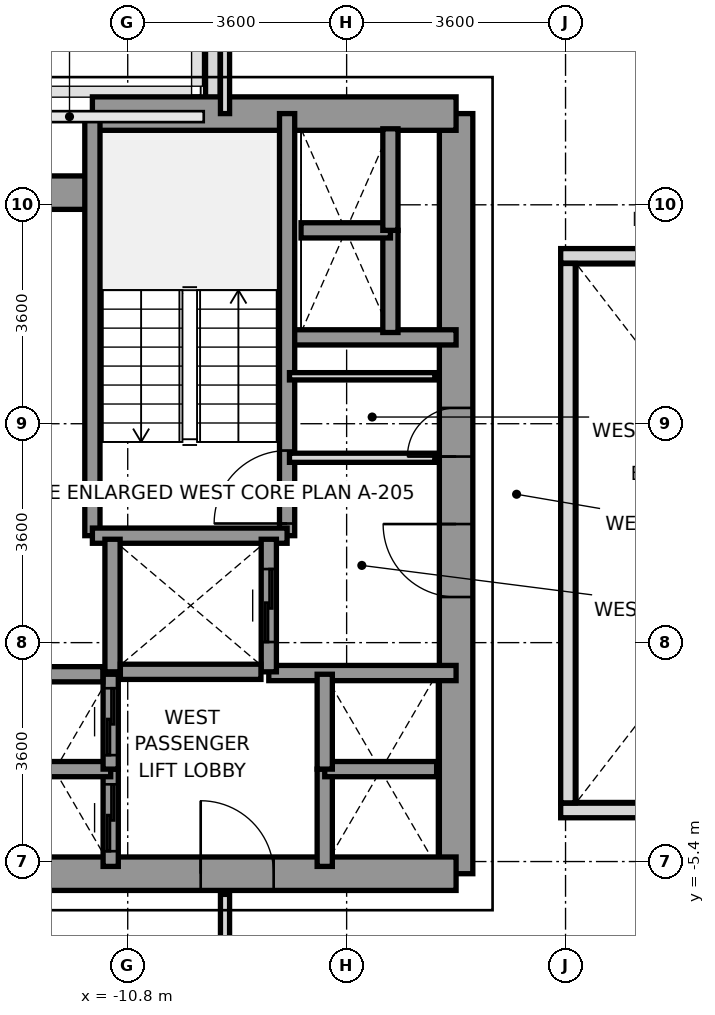
"""IFC4 building model, lengths in metres.
Left out: names, types, materials, properties, quantities, classifications, styles, units other than length and angle.
Written with IfcOpenShell. Run it as: python <this file> out.ifc"""

import sys

from ifc_helpers import new_model, si_unit, direction, frame, frame_2d, origin, place, context, subcontext, project, spatial, rectangle, extrude, source, transform, mapped, element, fill, save


model = new_model("IFC4")
c1 = context("Model", 3, precision=1e-05, world=origin(), true_north=direction((0.0, 1.0)))
c2 = subcontext(c1, "Body", "Model", "MODEL_VIEW")
j1 = project(units=[si_unit("LENGTHUNIT", "METRE"), si_unit("PLANEANGLEUNIT", "RADIAN")], contexts=[c1])
p1 = place(None, origin())
s1 = spatial("IfcSite", under=j1, at=p1, CompositionType="ELEMENT")
p2 = place(p1, origin())
s2 = spatial("IfcBuilding", under=s1, at=p2, CompositionType="ELEMENT")
p3 = place(p2, frame((0.0, 0.0, 51.0)))
s3 = spatial("IfcBuildingStorey", under=s2, at=p3, CompositionType="ELEMENT", Elevation=51.0)
p4 = place(p3, frame((-9.4, 6.953, 0.0), z_axis=(0.0, 0.0, 1.0), x_axis=(0.0, 1.0, 0.0)))
e1 = element("IfcWall", 1, at=p4, inside=s3, PredefinedType="PARAPET", context=c2, shape_type="SweptSolid", body=[
    extrude(rectangle(XDim=1.444, YDim=0.24, at=frame_2d((0.722, 0.0))), origin(), (0.0, 0.0, 1.0), 1.15),
])
p5 = place(p3, frame((-5.4, -5.6, 0.0), z_axis=(0.0, 0.0, 1.0), x_axis=(0.0, 1.0, 0.0)))
e2 = element("IfcWall", 2, at=p5, inside=s3, PredefinedType="SHEAR", context=c2, shape_type="SweptSolid", body=[
    extrude(rectangle(XDim=12.5, YDim=0.55, at=frame_2d((6.25, 0.0))), origin(), (0.0, 0.0, 1.0), 3.2),
])
p6 = place(p5, frame((4.55, 0.0, 0.0)))
e3 = element("IfcOpeningElement", 3, at=p6, cuts=e2, PredefinedType="OPENING", context=c2, shape_type="SweptSolid", body=[
    extrude(rectangle(XDim=1.2, YDim=2.2, at=frame_2d((0.6, 1.1))), frame((0.0, 0.285, 0.0), z_axis=(0.0, -1.0, 0.0), x_axis=(1.0, 0.0, 0.0)), (0.0, 0.0, 1.0), 0.57),
])
p7 = place(p5, frame((6.86, 0.0, 0.0)))
e4 = element("IfcOpeningElement", 4, at=p7, cuts=e2, PredefinedType="OPENING", context=c2, shape_type="SweptSolid", body=[
    extrude(rectangle(XDim=0.8, YDim=2.1, at=frame_2d((0.4, 1.05))), frame((0.0, 0.285, 0.0), z_axis=(0.0, -1.0, 0.0), x_axis=(1.0, 0.0, 0.0)), (0.0, 0.0, 1.0), 0.57),
])
p8 = place(p3, frame((-11.381, 6.9, 0.0), z_axis=(0.0, 0.0, 1.0), x_axis=(1.0, 0.0, 0.0)))
e5 = element("IfcWall", 5, at=p8, inside=s3, PredefinedType="SHEAR", context=c2, shape_type="SweptSolid", body=[
    extrude(rectangle(XDim=5.981, YDim=0.55, at=frame_2d((2.991, 0.0))), origin(), (0.0, 0.0, 1.0), 3.2),
])
p9 = place(p3, frame((-13.2, 5.6, 0.0), z_axis=(0.0, 0.0, 1.0), x_axis=(1.0, 0.0, 0.0)))
e6 = element("IfcWall", 6, at=p9, inside=s3, PredefinedType="SHEAR", context=c2, shape_type="SweptSolid", body=[
    extrude(rectangle(XDim=1.819, YDim=0.55, at=frame_2d((0.909, 0.0))), origin(), (0.0, 0.0, 1.0), 3.2),
])
p10 = place(p3, frame((-13.2, -5.6, 0.0), z_axis=(0.0, 0.0, 1.0), x_axis=(1.0, 0.0, 0.0)))
e7 = element("IfcWall", 7, at=p10, inside=s3, PredefinedType="SHEAR", context=c2, shape_type="SweptSolid", body=[
    extrude(rectangle(XDim=7.8, YDim=0.55, at=frame_2d((3.9, 0.0))), origin(), (0.0, 0.0, 1.0), 3.2),
])
p11 = place(p10, frame((3.6, 0.0, 0.0)))
e8 = element("IfcOpeningElement", 8, at=p11, cuts=e7, PredefinedType="OPENING", context=c2, shape_type="SweptSolid", body=[
    extrude(rectangle(XDim=1.2, YDim=2.2, at=frame_2d((0.6, 1.1))), frame((0.0, 0.285, 0.0), z_axis=(0.0, -1.0, 0.0), x_axis=(1.0, 0.0, 0.0)), (0.0, 0.0, 1.0), 0.57),
])
p12 = place(p3, frame((-8.18, 3.22, 0.0), z_axis=(0.0, 0.0, 1.0), x_axis=(1.0, 0.0, 0.0)))
e9 = element("IfcWall", 9, at=p12, inside=s3, PredefinedType="SOLIDWALL", context=c2, shape_type="SweptSolid", body=[
    extrude(rectangle(XDim=2.78, YDim=0.25, at=frame_2d((1.39, 0.0))), origin(), (0.0, 0.0, 1.0), 3.2),
])
p13 = place(p3, frame((-8.48, -2.3, 0.0), z_axis=(0.0, 0.0, 1.0), x_axis=(1.0, 0.0, 0.0)))
e10 = element("IfcWall", 10, at=p13, inside=s3, PredefinedType="SOLIDWALL", context=c2, shape_type="SweptSolid", body=[
    extrude(rectangle(XDim=3.08, YDim=0.25, at=frame_2d((1.54, 0.0))), origin(), (0.0, 0.0, 1.0), 3.2),
])
p14 = place(p3, frame((-8.179, -0.041, 0.0), z_axis=(0.0, 0.0, 1.0), x_axis=(0.0, 1.0, 0.0)))
e11 = element("IfcWall", 11, at=p14, inside=s3, PredefinedType="SOLIDWALL", context=c2, shape_type="SweptSolid", body=[
    extrude(rectangle(XDim=6.941, YDim=0.25, at=frame_2d((3.47, 0.0))), origin(), (0.0, 0.0, 1.0), 3.2),
])
p15 = place(p14, frame((0.2, 0.0, 0.0)))
e12 = element("IfcOpeningElement", 12, at=p15, cuts=e11, PredefinedType="OPENING", context=c2, shape_type="SweptSolid", body=[
    extrude(rectangle(XDim=1.2, YDim=2.2, at=frame_2d((0.6, 1.1))), frame((0.0, 0.135, 0.0), z_axis=(0.0, -1.0, 0.0), x_axis=(1.0, 0.0, 0.0)), (0.0, 0.0, 1.0), 0.27),
])
p16 = place(p3, frame((-11.381, -0.041, 0.0), z_axis=(0.0, 0.0, 1.0), x_axis=(0.0, 1.0, 0.0)))
e13 = element("IfcWall", 13, at=p16, inside=s3, PredefinedType="SOLIDWALL", context=c2, shape_type="SweptSolid", body=[
    extrude(rectangle(XDim=6.941, YDim=0.25, at=frame_2d((3.47, 0.0))), origin(), (0.0, 0.0, 1.0), 3.2),
])
p17 = place(p3, frame((-11.381, -0.041, 0.0), z_axis=(0.0, 0.0, 1.0), x_axis=(1.0, 0.0, 0.0)))
e14 = element("IfcWall", 14, at=p17, inside=s3, PredefinedType="SOLIDWALL", context=c2, shape_type="SweptSolid", body=[
    extrude(rectangle(XDim=3.202, YDim=0.25, at=frame_2d((1.601, 0.0))), origin(), (0.0, 0.0, 1.0), 3.2),
])
p18 = place(p3, frame((-11.05, -2.28, 0.0), z_axis=(0.0, 0.0, 1.0), x_axis=(0.0, 1.0, 0.0)))
e15 = element("IfcWall", 15, at=p18, inside=s3, PredefinedType="SOLIDWALL", context=c2, shape_type="SweptSolid", body=[
    extrude(rectangle(XDim=2.18, YDim=0.25, at=frame_2d((1.09, 0.0))), origin(), (0.0, 0.0, 1.0), 3.2),
])
p19 = place(p3, frame((-8.48, -2.28, 0.0), z_axis=(0.0, 0.0, 1.0), x_axis=(0.0, 1.0, 0.0)))
e16 = element("IfcWall", 16, at=p19, inside=s3, PredefinedType="SOLIDWALL", context=c2, shape_type="SweptSolid", body=[
    extrude(rectangle(XDim=2.18, YDim=0.25, at=frame_2d((1.09, 0.0))), origin(), (0.0, 0.0, 1.0), 3.2),
])
p20 = place(p19, frame((0.49, 0.0, 0.0)))
e17 = element("IfcOpeningElement", 17, at=p20, cuts=e16, PredefinedType="OPENING", context=c2, shape_type="SweptSolid", body=[
    extrude(rectangle(XDim=1.2, YDim=2.2, at=frame_2d((0.6, 1.1))), frame((0.0, 0.135, 0.0), z_axis=(0.0, -1.0, 0.0), x_axis=(1.0, 0.0, 0.0)), (0.0, 0.0, 1.0), 0.27),
])
p21 = place(p3, frame((-10.921, -2.28, 0.0), z_axis=(0.0, 0.0, 1.0), x_axis=(1.0, 0.0, 0.0)))
e18 = element("IfcWall", 18, at=p21, inside=s3, PredefinedType="SOLIDWALL", context=c2, shape_type="SweptSolid", body=[
    extrude(rectangle(XDim=2.312, YDim=0.25, at=frame_2d((1.156, 0.0))), origin(), (0.0, 0.0, 1.0), 3.2),
])
p22 = place(p3, frame((-11.08, -5.48, 0.0), z_axis=(0.0, 0.0, 1.0), x_axis=(0.0, 1.0, 0.0)))
e19 = element("IfcWall", 19, at=p22, inside=s3, PredefinedType="SOLIDWALL", context=c2, shape_type="SweptSolid", body=[
    extrude(rectangle(XDim=1.6, YDim=0.25, at=frame_2d((0.8, 0.0))), origin(), (0.0, 0.0, 1.0), 3.2),
])
p23 = place(p22, frame((0.25, 0.0, 0.0)))
e20 = element("IfcOpeningElement", 20, at=p23, cuts=e19, PredefinedType="OPENING", context=c2, shape_type="SweptSolid", body=[
    extrude(rectangle(XDim=1.1, YDim=2.2, at=frame_2d((0.55, 1.1))), frame((0.0, 0.135, 0.0), z_axis=(0.0, -1.0, 0.0), x_axis=(1.0, 0.0, 0.0)), (0.0, 0.0, 1.0), 0.27),
])
p24 = place(p3, frame((-12.92, -3.88, 0.0), z_axis=(0.0, 0.0, 1.0), x_axis=(1.0, 0.0, 0.0)))
e21 = element("IfcWall", 21, at=p24, inside=s3, PredefinedType="SOLIDWALL", context=c2, shape_type="SweptSolid", body=[
    extrude(rectangle(XDim=1.84, YDim=0.25, at=frame_2d((0.92, 0.0))), origin(), (0.0, 0.0, 1.0), 3.2),
])
p25 = place(p3, frame((-11.08, -3.88, 0.0), z_axis=(0.0, 0.0, 1.0), x_axis=(0.0, 1.0, 0.0)))
e22 = element("IfcWall", 22, at=p25, inside=s3, PredefinedType="SOLIDWALL", context=c2, shape_type="SweptSolid", body=[
    extrude(rectangle(XDim=1.56, YDim=0.25, at=frame_2d((0.78, 0.0))), origin(), (0.0, 0.0, 1.0), 3.2),
])
p26 = place(p25, frame((0.23, 0.0, 0.0)))
e23 = element("IfcOpeningElement", 23, at=p26, cuts=e22, PredefinedType="OPENING", context=c2, shape_type="SweptSolid", body=[
    extrude(rectangle(XDim=1.1, YDim=2.2, at=frame_2d((0.55, 1.1))), frame((0.0, 0.135, 0.0), z_axis=(0.0, -1.0, 0.0), x_axis=(1.0, 0.0, 0.0)), (0.0, 0.0, 1.0), 0.27),
])
p27 = place(p3, frame((-12.791, -2.32, 0.0), z_axis=(0.0, 0.0, 1.0), x_axis=(1.0, 0.0, 0.0)))
e24 = element("IfcWall", 24, at=p27, inside=s3, PredefinedType="SOLIDWALL", context=c2, shape_type="SweptSolid", body=[
    extrude(rectangle(XDim=1.582, YDim=0.25, at=frame_2d((0.791, 0.0))), origin(), (0.0, 0.0, 1.0), 3.2),
])
p28 = place(p3, frame((-7.56, -5.48, 0.0), z_axis=(0.0, 0.0, 1.0), x_axis=(0.0, 1.0, 0.0)))
e25 = element("IfcWall", 25, at=p28, inside=s3, PredefinedType="SOLIDWALL", context=c2, shape_type="SweptSolid", body=[
    extrude(rectangle(XDim=1.6, YDim=0.25, at=frame_2d((0.8, 0.0))), origin(), (0.0, 0.0, 1.0), 3.2),
])
p29 = place(p3, frame((-7.56, -3.88, 0.0), z_axis=(0.0, 0.0, 1.0), x_axis=(1.0, 0.0, 0.0)))
e26 = element("IfcWall", 26, at=p29, inside=s3, PredefinedType="SOLIDWALL", context=c2, shape_type="SweptSolid", body=[
    extrude(rectangle(XDim=1.84, YDim=0.25, at=frame_2d((0.92, 0.0))), origin(), (0.0, 0.0, 1.0), 3.2),
])
p30 = place(p3, frame((-7.56, -3.88, 0.0), z_axis=(0.0, 0.0, 1.0), x_axis=(0.0, 1.0, 0.0)))
e27 = element("IfcWall", 27, at=p30, inside=s3, PredefinedType="SOLIDWALL", context=c2, shape_type="SweptSolid", body=[
    extrude(rectangle(XDim=1.56, YDim=0.25, at=frame_2d((0.78, 0.0))), origin(), (0.0, 0.0, 1.0), 3.2),
])
p31 = place(p3, frame((-6.48, 3.3, 0.0), z_axis=(0.0, 0.0, 1.0), x_axis=(0.0, 1.0, 0.0)))
e28 = element("IfcWall", 28, at=p31, inside=s3, PredefinedType="SOLIDWALL", context=c2, shape_type="SweptSolid", body=[
    extrude(rectangle(XDim=1.68, YDim=0.25, at=frame_2d((0.84, 0.0))), origin(), (0.0, 0.0, 1.0), 3.2),
])
p32 = place(p3, frame((-7.95, 4.98, 0.0), z_axis=(0.0, 0.0, 1.0), x_axis=(1.0, 0.0, 0.0)))
e29 = element("IfcWall", 29, at=p32, inside=s3, PredefinedType="SOLIDWALL", context=c2, shape_type="SweptSolid", body=[
    extrude(rectangle(XDim=1.47, YDim=0.25, at=frame_2d((0.735, 0.0))), origin(), (0.0, 0.0, 1.0), 3.2),
])
p33 = place(p3, frame((-6.48, 4.98, 0.0), z_axis=(0.0, 0.0, 1.0), x_axis=(0.0, 1.0, 0.0)))
e30 = element("IfcWall", 30, at=p33, inside=s3, PredefinedType="SOLIDWALL", context=c2, shape_type="SweptSolid", body=[
    extrude(rectangle(XDim=1.67, YDim=0.25, at=frame_2d((0.835, 0.0))), origin(), (0.0, 0.0, 1.0), 3.2),
])
p34 = place(p3, frame((-8.14, 1.24, 0.0), z_axis=(0.0, 0.0, 1.0), x_axis=(1.0, 0.0, 0.0)))
e31 = element("IfcWall", 31, at=p34, inside=s3, PredefinedType="PARTITIONING", context=c2, shape_type="SweptSolid", body=[
    extrude(rectangle(XDim=2.39, YDim=0.15, at=frame_2d((1.195, 0.0))), origin(), (0.0, 0.0, 1.0), 2.3),
])
p35 = place(p3, frame((-8.14, 2.58, 0.0), z_axis=(0.0, 0.0, 1.0), x_axis=(1.0, 0.0, 0.0)))
e32 = element("IfcWall", 32, at=p35, inside=s3, PredefinedType="PARTITIONING", context=c2, shape_type="SweptSolid", body=[
    extrude(rectangle(XDim=2.39, YDim=0.12, at=frame_2d((1.195, 0.0))), origin(), (0.0, 0.0, 1.0), 2.3),
])
p36 = place(p3, frame((-9.2, 6.9, 0.0), z_axis=(0.0, 0.0, 1.0), x_axis=(0.0, 1.0, 0.0)))
e33 = element("IfcWall", 33, at=p36, inside=s3, PredefinedType="PARTITIONING", context=c2, shape_type="SweptSolid", body=[
    extrude(rectangle(XDim=8.78, YDim=0.15, at=frame_2d((4.39, 0.0))), origin(), (0.0, 0.0, 1.0), 2.65),
])
p37 = place(p3, frame((-9.2, -15.68, 0.0), z_axis=(0.0, 0.0, 1.0), x_axis=(0.0, 1.0, 0.0)))
e34 = element("IfcWall", 34, at=p37, inside=s3, PredefinedType="PARTITIONING", context=c2, shape_type="SweptSolid", body=[
    extrude(rectangle(XDim=9.74, YDim=0.15, at=frame_2d((4.87, 0.0))), origin(), (0.0, 0.0, 1.0), 2.65),
])
for number, where, z_axis, x_axis in (
    (35, (-3.68, -4.56, 0.0), (0.0, 0.0, 1.0), (1.0, 0.0, 0.0)),
    (36, (-3.68, 4.56, 0.0), (0.0, 0.0, 1.0), (1.0, 0.0, 0.0)),
):
    element("IfcWall", number, at=place(p3, frame(where, z_axis=z_axis, x_axis=x_axis)), inside=s3, PredefinedType="PARAPET", context=c2, shape_type="SweptSolid", body=[
        extrude(rectangle(XDim=7.36, YDim=0.24, at=frame_2d((3.68, 0.0))), origin(), (0.0, 0.0, 1.0), 1.15),
    ])
p38 = place(p3, frame((-3.56, -4.435, 0.0), z_axis=(0.0, 0.0, 1.0), x_axis=(0.0, 1.0, 0.0)))
e37 = element("IfcWall", 37, at=p38, inside=s3, PredefinedType="PARAPET", context=c2, shape_type="SweptSolid", body=[
    extrude(rectangle(XDim=8.87, YDim=0.24, at=frame_2d((4.435, 0.0))), origin(), (0.0, 0.0, 1.0), 1.15),
])
m1 = source(origin(), c2, "Body", "SweptSolid", [
    extrude(rectangle(XDim=1.2, YDim=2.2, at=frame_2d((0.6, 1.1))), frame((0.0, 0.025, 0.0), z_axis=(0.0, -1.0, 0.0), x_axis=(1.0, 0.0, 0.0)), (0.0, 0.0, 1.0), 0.05),
])
p39 = place(p15, origin())
e38 = element("IfcDoor", 38, at=p39, inside=s3, OperationType="SINGLE_SWING_LEFT", PredefinedType="DOOR", context=c2, shape_type="MappedRepresentation", body=[
    mapped(m1, transform((0.0, 0.0, 0.0), x_axis=(1.0, 0.0, 0.0), y_axis=(0.0, 1.0, 0.0), z_axis=(0.0, 0.0, 1.0), scale=1.0)),
])
fill(e12, e38)
p40 = place(p6, origin())
e39 = element("IfcDoor", 39, at=p40, inside=s3, OperationType="SINGLE_SWING_RIGHT", PredefinedType="DOOR", context=c2, shape_type="MappedRepresentation", body=[
    mapped(m1, transform((0.0, 0.0, 0.0), x_axis=(1.0, 0.0, 0.0), y_axis=(0.0, 1.0, 0.0), z_axis=(0.0, 0.0, 1.0), scale=1.0)),
])
fill(e3, e39)
p41 = place(p11, origin())
e40 = element("IfcDoor", 40, at=p41, inside=s3, OperationType="SINGLE_SWING_LEFT", PredefinedType="DOOR", context=c2, shape_type="MappedRepresentation", body=[
    mapped(m1, transform((0.0, 0.0, 0.0), x_axis=(1.0, 0.0, 0.0), y_axis=(0.0, 1.0, 0.0), z_axis=(0.0, 0.0, 1.0), scale=1.0)),
])
fill(e8, e40)
m2 = source(origin(), c2, "Body", "SweptSolid", [
    extrude(rectangle(XDim=0.8, YDim=2.1, at=frame_2d((0.4, 1.05))), frame((0.0, 0.025, 0.0), z_axis=(0.0, -1.0, 0.0), x_axis=(1.0, 0.0, 0.0)), (0.0, 0.0, 1.0), 0.05),
])
p42 = place(p7, origin())
e41 = element("IfcDoor", 41, at=p42, inside=s3, OperationType="SINGLE_SWING_LEFT", PredefinedType="DOOR", context=c2, shape_type="MappedRepresentation", body=[
    mapped(m2, transform((0.0, 0.0, 0.0), x_axis=(1.0, 0.0, 0.0), y_axis=(0.0, 1.0, 0.0), z_axis=(0.0, 0.0, 1.0), scale=1.0)),
])
fill(e4, e41)
p43 = place(p20, origin())
e42 = element("IfcDoor", 42, at=p43, inside=s3, OperationType="SLIDING_TO_RIGHT", PredefinedType="DOOR", context=c2, shape_type="MappedRepresentation", body=[
    mapped(m1, transform((0.0, 0.0, 0.0), x_axis=(1.0, 0.0, 0.0), y_axis=(0.0, 1.0, 0.0), z_axis=(0.0, 0.0, 1.0), scale=1.0)),
])
fill(e17, e42)
m3 = source(origin(), c2, "Body", "SweptSolid", [
    extrude(rectangle(XDim=1.1, YDim=2.2, at=frame_2d((0.55, 1.1))), frame((0.0, 0.025, 0.0), z_axis=(0.0, -1.0, 0.0), x_axis=(1.0, 0.0, 0.0)), (0.0, 0.0, 1.0), 0.05),
])
p44 = place(p23, origin())
e43 = element("IfcDoor", 43, at=p44, inside=s3, OperationType="SLIDING_TO_LEFT", PredefinedType="DOOR", context=c2, shape_type="MappedRepresentation", body=[
    mapped(m3, transform((0.0, 0.0, 0.0), x_axis=(1.0, 0.0, 0.0), y_axis=(0.0, 1.0, 0.0), z_axis=(0.0, 0.0, 1.0), scale=1.0)),
])
fill(e20, e43)
p45 = place(p26, origin())
e44 = element("IfcDoor", 44, at=p45, inside=s3, OperationType="SLIDING_TO_LEFT", PredefinedType="DOOR", context=c2, shape_type="MappedRepresentation", body=[
    mapped(m3, transform((0.0, 0.0, 0.0), x_axis=(1.0, 0.0, 0.0), y_axis=(0.0, 1.0, 0.0), z_axis=(0.0, 0.0, 1.0), scale=1.0)),
])
fill(e23, e44)
save(model, sys.argv[1])
